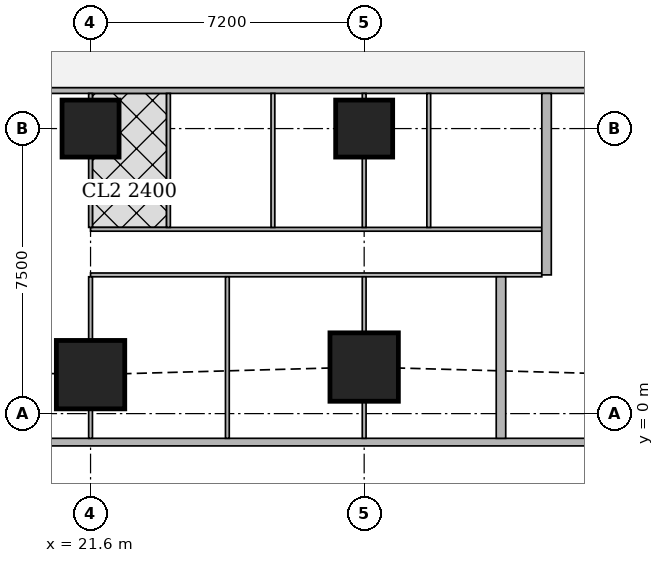
"""IFC4 building model, lengths in metres.
Left out: names, types, materials, properties, quantities, classifications, styles, units other than length and angle.
Written with IfcOpenShell. Run it as: python <this file> out.ifc"""

import sys

from ifc_helpers import new_model, si_unit, direction, frame, frame_2d, origin, origin_2d, place, context, subcontext, project, spatial, rectangle, extrude, element, fill, save


model = new_model("IFC4")
c1 = context("Model", 3, precision=1e-05, world=origin(), true_north=direction((0.0, 1.0)))
c2 = subcontext(c1, "Body", "Model", "MODEL_VIEW")
j1 = project(units=[si_unit("LENGTHUNIT", "METRE"), si_unit("PLANEANGLEUNIT", "RADIAN")], contexts=[c1])
p1 = place(None, origin())
s1 = spatial("IfcSite", under=j1, at=p1, CompositionType="ELEMENT")
p2 = place(p1, origin())
s2 = spatial("IfcBuilding", under=s1, at=p2, CompositionType="ELEMENT")
p3 = place(p2, frame((0.0, 0.0, 158.3)))
s3 = spatial("IfcBuildingStorey", under=s2, at=p3, CompositionType="ELEMENT", Elevation=158.3)
for number, where, z_axis, x_axis in (
    (1, (21.6, 1.025, 0.0), (0.0, 0.0, 1.0), (1.0, 0.0, 0.0)),
    (2, (28.8, 1.225, 0.0), (0.0, 0.0, 1.0), (1.0, 0.0, 0.0)),
):
    element("IfcColumn", number, at=place(p3, frame(where, z_axis=z_axis, x_axis=x_axis)), inside=s3, PredefinedType="COLUMN", context=c2, shape_type="SweptSolid", body=[
        extrude(rectangle(XDim=1.8, YDim=1.8, at=origin_2d()), origin(), (0.0, 0.0, 1.0), 3.75),
    ])
for number, where, z_axis, x_axis in (
    (3, (21.6, 7.5, 0.0), (0.0, 0.0, 1.0), (1.0, 0.0, 0.0)),
    (4, (28.8, 7.5, 0.0), (0.0, 0.0, 1.0), (1.0, 0.0, 0.0)),
):
    element("IfcColumn", number, at=place(p3, frame(where, z_axis=z_axis, x_axis=x_axis)), inside=s3, PredefinedType="COLUMN", context=c2, shape_type="SweptSolid", body=[
        extrude(rectangle(XDim=1.5, YDim=1.5, at=origin_2d()), origin(), (0.0, 0.0, 1.0), 3.75),
    ])
p4 = place(p3, frame((2.163, -0.75, 0.0), z_axis=(0.0, 0.0, 1.0), x_axis=(1.0, 0.0, 0.0)))
e5 = element("IfcWall", 5, at=p4, inside=s3, PredefinedType="SOLIDWALL", context=c2, shape_type="SweptSolid", body=[
    extrude(rectangle(XDim=45.628, YDim=0.2, at=frame_2d((22.814, 0.0))), origin(), (0.0, 0.0, 1.0), 3.5),
])
p5 = place(p4, frame((9.537, 0.0, 0.9)))
e6 = element("IfcOpeningElement", 6, at=p5, cuts=e5, PredefinedType="OPENING", context=c2, shape_type="SweptSolid", body=[
    extrude(rectangle(XDim=1.8, YDim=1.5, at=frame_2d((0.9, 0.75))), frame((0.0, 0.11, 0.0), z_axis=(0.0, -1.0, 0.0), x_axis=(1.0, 0.0, 0.0)), (0.0, 0.0, 1.0), 0.22),
])
p6 = place(p4, frame((13.137, 0.0, 0.9)))
e7 = element("IfcOpeningElement", 7, at=p6, cuts=e5, PredefinedType="OPENING", context=c2, shape_type="SweptSolid", body=[
    extrude(rectangle(XDim=1.8, YDim=1.5, at=frame_2d((0.9, 0.75))), frame((0.0, 0.11, 0.0), z_axis=(0.0, -1.0, 0.0), x_axis=(1.0, 0.0, 0.0)), (0.0, 0.0, 1.0), 0.22),
])
p7 = place(p4, frame((16.737, 0.0, 0.9)))
e8 = element("IfcOpeningElement", 8, at=p7, cuts=e5, PredefinedType="OPENING", context=c2, shape_type="SweptSolid", body=[
    extrude(rectangle(XDim=1.8, YDim=1.5, at=frame_2d((0.9, 0.75))), frame((0.0, 0.11, 0.0), z_axis=(0.0, -1.0, 0.0), x_axis=(1.0, 0.0, 0.0)), (0.0, 0.0, 1.0), 0.22),
])
p8 = place(p4, frame((20.337, 0.0, 0.9)))
e9 = element("IfcOpeningElement", 9, at=p8, cuts=e5, PredefinedType="OPENING", context=c2, shape_type="SweptSolid", body=[
    extrude(rectangle(XDim=1.8, YDim=1.5, at=frame_2d((0.9, 0.75))), frame((0.0, 0.11, 0.0), z_axis=(0.0, -1.0, 0.0), x_axis=(1.0, 0.0, 0.0)), (0.0, 0.0, 1.0), 0.22),
])
p9 = place(p4, frame((23.937, 0.0, 0.9)))
e10 = element("IfcOpeningElement", 10, at=p9, cuts=e5, PredefinedType="OPENING", context=c2, shape_type="SweptSolid", body=[
    extrude(rectangle(XDim=1.8, YDim=1.5, at=frame_2d((0.9, 0.75))), frame((0.0, 0.11, 0.0), z_axis=(0.0, -1.0, 0.0), x_axis=(1.0, 0.0, 0.0)), (0.0, 0.0, 1.0), 0.22),
])
p10 = place(p4, frame((27.537, 0.0, 0.9)))
e11 = element("IfcOpeningElement", 11, at=p10, cuts=e5, PredefinedType="OPENING", context=c2, shape_type="SweptSolid", body=[
    extrude(rectangle(XDim=1.8, YDim=1.5, at=frame_2d((0.9, 0.75))), frame((0.0, 0.11, 0.0), z_axis=(0.0, -1.0, 0.0), x_axis=(1.0, 0.0, 0.0)), (0.0, 0.0, 1.0), 0.22),
])
p11 = place(p4, frame((31.137, 0.0, 0.9)))
e12 = element("IfcOpeningElement", 12, at=p11, cuts=e5, PredefinedType="OPENING", context=c2, shape_type="SweptSolid", body=[
    extrude(rectangle(XDim=1.8, YDim=1.5, at=frame_2d((0.9, 0.75))), frame((0.0, 0.11, 0.0), z_axis=(0.0, -1.0, 0.0), x_axis=(1.0, 0.0, 0.0)), (0.0, 0.0, 1.0), 0.22),
])
p12 = place(p4, frame((34.737, 0.0, 0.9)))
e13 = element("IfcOpeningElement", 13, at=p12, cuts=e5, PredefinedType="OPENING", context=c2, shape_type="SweptSolid", body=[
    extrude(rectangle(XDim=1.8, YDim=1.5, at=frame_2d((0.9, 0.75))), frame((0.0, 0.11, 0.0), z_axis=(0.0, -1.0, 0.0), x_axis=(1.0, 0.0, 0.0)), (0.0, 0.0, 1.0), 0.22),
])
p13 = place(p3, frame((40.053, 8.5, 0.0), z_axis=(0.0, 0.0, 1.0), x_axis=(-1.0, 0.0, 0.0)))
e14 = element("IfcWall", 14, at=p13, inside=s3, PredefinedType="SOLIDWALL", context=c2, shape_type="SweptSolid", body=[
    extrude(rectangle(XDim=31.703, YDim=0.15, at=frame_2d((15.852, 0.0))), origin(), (0.0, 0.0, 1.0), 3.5),
])
p14 = place(p13, frame((28.103, 0.0, 0.0)))
e15 = element("IfcOpeningElement", 15, at=p14, cuts=e14, PredefinedType="OPENING", context=c2, shape_type="SweptSolid", body=[
    extrude(rectangle(XDim=1.0, YDim=2.1, at=frame_2d((0.5, 1.05))), frame((0.0, 0.085, 0.0), z_axis=(0.0, -1.0, 0.0), x_axis=(1.0, 0.0, 0.0)), (0.0, 0.0, 1.0), 0.17),
])
p15 = place(p13, frame((19.754, 0.0, 0.0)))
e16 = element("IfcOpeningElement", 16, at=p15, cuts=e14, PredefinedType="OPENING", context=c2, shape_type="SweptSolid", body=[
    extrude(rectangle(XDim=1.0, YDim=2.1, at=frame_2d((0.5, 1.05))), frame((0.0, 0.085, 0.0), z_axis=(0.0, -1.0, 0.0), x_axis=(1.0, 0.0, 0.0)), (0.0, 0.0, 1.0), 0.17),
])
p16 = place(p13, frame((5.354, 0.0, 0.0)))
e17 = element("IfcOpeningElement", 17, at=p16, cuts=e14, PredefinedType="OPENING", context=c2, shape_type="SweptSolid", body=[
    extrude(rectangle(XDim=1.0, YDim=2.1, at=frame_2d((0.5, 1.05))), frame((0.0, 0.085, 0.0), z_axis=(0.0, -1.0, 0.0), x_axis=(1.0, 0.0, 0.0)), (0.0, 0.0, 1.0), 0.17),
])
p17 = place(p3, frame((33.623, 43.022, 0.0), z_axis=(0.0, 0.0, 1.0), x_axis=(0.185596841028, -0.98262597798, 0.0)))
e18 = element("IfcWall", 18, at=p17, inside=s3, PredefinedType="SOLIDWALL", context=c2, shape_type="SweptSolid", body=[
    extrude(rectangle(XDim=41.66, YDim=0.15, at=frame_2d((20.83, 0.0))), origin(), (0.0, 0.0, 1.0), 2.5),
])
p18 = place(p17, frame((21.514, 0.0, 0.0)))
e19 = element("IfcOpeningElement", 19, at=p18, cuts=e18, PredefinedType="OPENING", context=c2, shape_type="SweptSolid", body=[
    extrude(rectangle(XDim=1.0, YDim=2.1, at=frame_2d((0.5, 1.05))), frame((0.0, 0.085, 0.0), z_axis=(0.0, -1.0, 0.0), x_axis=(1.0, 0.0, 0.0)), (0.0, 0.0, 1.0), 0.17),
])
p19 = place(p17, frame((27.062, 0.0, 0.0)))
e20 = element("IfcOpeningElement", 20, at=p19, cuts=e18, PredefinedType="OPENING", context=c2, shape_type="SweptSolid", body=[
    extrude(rectangle(XDim=1.0, YDim=2.1, at=frame_2d((0.5, 1.05))), frame((0.0, 0.085, 0.0), z_axis=(0.0, -1.0, 0.0), x_axis=(1.0, 0.0, 0.0)), (0.0, 0.0, 1.0), 0.17),
])
p20 = place(p17, frame((29.934, 0.0, 0.0)))
e21 = element("IfcOpeningElement", 21, at=p20, cuts=e18, PredefinedType="OPENING", context=c2, shape_type="SweptSolid", body=[
    extrude(rectangle(XDim=1.0, YDim=2.1, at=frame_2d((0.5, 1.05))), frame((0.0, 0.085, 0.0), z_axis=(0.0, -1.0, 0.0), x_axis=(1.0, 0.0, 0.0)), (0.0, 0.0, 1.0), 0.17),
])
p21 = place(p3, frame((33.474, 3.65, 0.0), z_axis=(0.0, 0.0, 1.0), x_axis=(-1.0, 0.0, 0.0)))
e22 = element("IfcWall", 22, at=p21, inside=s3, PredefinedType="PARTITIONING", context=c2, shape_type="SweptSolid", body=[
    extrude(rectangle(XDim=11.874, YDim=0.1, at=frame_2d((5.937, 0.0))), origin(), (0.0, 0.0, 1.0), 3.5),
])
p22 = place(p21, frame((10.774, 0.0, 0.0)))
e23 = element("IfcOpeningElement", 23, at=p22, cuts=e22, PredefinedType="OPENING", context=c2, shape_type="SweptSolid", body=[
    extrude(rectangle(XDim=0.9, YDim=2.1, at=frame_2d((0.45, 1.05))), frame((0.0, 0.06, 0.0), z_axis=(0.0, -1.0, 0.0), x_axis=(1.0, 0.0, 0.0)), (0.0, 0.0, 1.0), 0.12),
])
p23 = place(p21, frame((7.174, 0.0, 0.0)))
e24 = element("IfcOpeningElement", 24, at=p23, cuts=e22, PredefinedType="OPENING", context=c2, shape_type="SweptSolid", body=[
    extrude(rectangle(XDim=0.9, YDim=2.1, at=frame_2d((0.45, 1.05))), frame((0.0, 0.06, 0.0), z_axis=(0.0, -1.0, 0.0), x_axis=(1.0, 0.0, 0.0)), (0.0, 0.0, 1.0), 0.12),
])
p24 = place(p21, frame((3.574, 0.0, 0.0)))
e25 = element("IfcOpeningElement", 25, at=p24, cuts=e22, PredefinedType="OPENING", context=c2, shape_type="SweptSolid", body=[
    extrude(rectangle(XDim=0.9, YDim=2.1, at=frame_2d((0.45, 1.05))), frame((0.0, 0.06, 0.0), z_axis=(0.0, -1.0, 0.0), x_axis=(1.0, 0.0, 0.0)), (0.0, 0.0, 1.0), 0.12),
])
p25 = place(p3, frame((33.474, 4.85, 0.0), z_axis=(0.0, 0.0, 1.0), x_axis=(-1.0, 0.0, 0.0)))
e26 = element("IfcWall", 26, at=p25, inside=s3, PredefinedType="PARTITIONING", context=c2, shape_type="SweptSolid", body=[
    extrude(rectangle(XDim=11.874, YDim=0.1, at=frame_2d((5.937, 0.0))), origin(), (0.0, 0.0, 1.0), 3.5),
])
p26 = place(p25, frame((10.399, 0.0, 0.0)))
e27 = element("IfcOpeningElement", 27, at=p26, cuts=e26, PredefinedType="OPENING", context=c2, shape_type="SweptSolid", body=[
    extrude(rectangle(XDim=0.9, YDim=2.1, at=frame_2d((0.45, 1.05))), frame((0.0, 0.06, 0.0), z_axis=(0.0, -1.0, 0.0), x_axis=(1.0, 0.0, 0.0)), (0.0, 0.0, 1.0), 0.12),
])
p27 = place(p25, frame((5.425, 0.0, 0.0)))
e28 = element("IfcOpeningElement", 28, at=p27, cuts=e26, PredefinedType="OPENING", context=c2, shape_type="SweptSolid", body=[
    extrude(rectangle(XDim=0.9, YDim=2.1, at=frame_2d((0.45, 1.05))), frame((0.0, 0.06, 0.0), z_axis=(0.0, -1.0, 0.0), x_axis=(1.0, 0.0, 0.0)), (0.0, 0.0, 1.0), 0.12),
])
p28 = place(p25, frame((3.374, 0.0, 0.0)))
e29 = element("IfcOpeningElement", 29, at=p28, cuts=e26, PredefinedType="OPENING", context=c2, shape_type="SweptSolid", body=[
    extrude(rectangle(XDim=0.9, YDim=2.1, at=frame_2d((0.45, 1.05))), frame((0.0, 0.06, 0.0), z_axis=(0.0, -1.0, 0.0), x_axis=(1.0, 0.0, 0.0)), (0.0, 0.0, 1.0), 0.12),
])
p29 = place(p25, frame((8.0, 0.0, 0.0)))
e30 = element("IfcOpeningElement", 30, at=p29, cuts=e26, PredefinedType="OPENING", context=c2, shape_type="SweptSolid", body=[
    extrude(rectangle(XDim=0.9, YDim=2.1, at=frame_2d((0.45, 1.05))), frame((0.0, 0.06, 0.0), z_axis=(0.0, -1.0, 0.0), x_axis=(1.0, 0.0, 0.0)), (0.0, 0.0, 1.0), 0.12),
])
p30 = place(p25, frame((0.975, 0.0, 0.0)))
e31 = element("IfcOpeningElement", 31, at=p30, cuts=e26, PredefinedType="OPENING", context=c2, shape_type="SweptSolid", body=[
    extrude(rectangle(XDim=0.9, YDim=2.1, at=frame_2d((0.45, 1.05))), frame((0.0, 0.06, 0.0), z_axis=(0.0, -1.0, 0.0), x_axis=(1.0, 0.0, 0.0)), (0.0, 0.0, 1.0), 0.12),
])
p31 = place(p3, frame((21.6, -0.65, 0.0), z_axis=(0.0, 0.0, 1.0), x_axis=(0.0, 1.0, 0.0)))
e32 = element("IfcWall", 32, at=p31, inside=s3, PredefinedType="PARTITIONING", context=c2, shape_type="SweptSolid", body=[
    extrude(rectangle(XDim=0.774, YDim=0.1, at=frame_2d((0.387, 0.0))), origin(), (0.0, 0.0, 1.0), 3.5),
])
p32 = place(p3, frame((21.6, 1.926, 0.0), z_axis=(0.0, 0.0, 1.0), x_axis=(0.0, 1.0, 0.0)))
e33 = element("IfcWall", 33, at=p32, inside=s3, PredefinedType="PARTITIONING", context=c2, shape_type="SweptSolid", body=[
    extrude(rectangle(XDim=1.674, YDim=0.1, at=frame_2d((0.837, 0.0))), origin(), (0.0, 0.0, 1.0), 3.5),
])
p33 = place(p3, frame((25.2, -0.65, 0.0), z_axis=(0.0, 0.0, 1.0), x_axis=(0.0, 1.0, 0.0)))
e34 = element("IfcWall", 34, at=p33, inside=s3, PredefinedType="PARTITIONING", context=c2, shape_type="SweptSolid", body=[
    extrude(rectangle(XDim=4.25, YDim=0.1, at=frame_2d((2.125, 0.0))), origin(), (0.0, 0.0, 1.0), 2.1),
])
p34 = place(p3, frame((28.8, -0.65, 0.0), z_axis=(0.0, 0.0, 1.0), x_axis=(0.0, 1.0, 0.0)))
e35 = element("IfcWall", 35, at=p34, inside=s3, PredefinedType="PARTITIONING", context=c2, shape_type="SweptSolid", body=[
    extrude(rectangle(XDim=0.974, YDim=0.1, at=frame_2d((0.487, 0.0))), origin(), (0.0, 0.0, 1.0), 3.5),
])
p35 = place(p3, frame((28.8, 2.126, 0.0), z_axis=(0.0, 0.0, 1.0), x_axis=(0.0, 1.0, 0.0)))
e36 = element("IfcWall", 36, at=p35, inside=s3, PredefinedType="PARTITIONING", context=c2, shape_type="SweptSolid", body=[
    extrude(rectangle(XDim=1.474, YDim=0.1, at=frame_2d((0.737, 0.0))), origin(), (0.0, 0.0, 1.0), 3.5),
])
p36 = place(p3, frame((21.6, 4.9, 0.0), z_axis=(0.0, 0.0, 1.0), x_axis=(0.0, 1.0, 0.0)))
e37 = element("IfcWall", 37, at=p36, inside=s3, PredefinedType="PARTITIONING", context=c2, shape_type="SweptSolid", body=[
    extrude(rectangle(XDim=1.849, YDim=0.1, at=frame_2d((0.925, 0.0))), origin(), (0.0, 0.0, 1.0), 3.5),
])
p37 = place(p3, frame((21.6, 8.251, 0.0), z_axis=(0.0, 0.0, 1.0), x_axis=(0.0, 1.0, 0.0)))
e38 = element("IfcWall", 38, at=p37, inside=s3, PredefinedType="PARTITIONING", context=c2, shape_type="SweptSolid", body=[
    extrude(rectangle(XDim=0.174, YDim=0.1, at=frame_2d((0.087, 0.0))), origin(), (0.0, 0.0, 1.0), 3.5),
])
p38 = place(p3, frame((26.399, 4.9, 0.0), z_axis=(0.0, 0.0, 1.0), x_axis=(0.0, 1.0, 0.0)))
e39 = element("IfcWall", 39, at=p38, inside=s3, PredefinedType="PARTITIONING", context=c2, shape_type="SweptSolid", body=[
    extrude(rectangle(XDim=3.525, YDim=0.1, at=frame_2d((1.763, 0.0))), origin(), (0.0, 0.0, 1.0), 3.5),
])
p39 = place(p3, frame((28.8, 4.9, 0.0), z_axis=(0.0, 0.0, 1.0), x_axis=(0.0, 1.0, 0.0)))
e40 = element("IfcWall", 40, at=p39, inside=s3, PredefinedType="PARTITIONING", context=c2, shape_type="SweptSolid", body=[
    extrude(rectangle(XDim=1.849, YDim=0.1, at=frame_2d((0.925, 0.0))), origin(), (0.0, 0.0, 1.0), 3.5),
])
p40 = place(p3, frame((28.8, 8.251, 0.0), z_axis=(0.0, 0.0, 1.0), x_axis=(0.0, 1.0, 0.0)))
e41 = element("IfcWall", 41, at=p40, inside=s3, PredefinedType="PARTITIONING", context=c2, shape_type="SweptSolid", body=[
    extrude(rectangle(XDim=0.174, YDim=0.1, at=frame_2d((0.087, 0.0))), origin(), (0.0, 0.0, 1.0), 3.5),
])
for number, where, z_axis, x_axis in (
    (42, (23.65, 4.9, 0.0), (0.0, 0.0, 1.0), (0.0, 1.0, 0.0)),
    (43, (30.5, 4.9, 0.0), (0.0, 0.0, 1.0), (0.0, 1.0, 0.0)),
):
    element("IfcWall", number, at=place(p3, frame(where, z_axis=z_axis, x_axis=x_axis)), inside=s3, PredefinedType="PARTITIONING", context=c2, shape_type="SweptSolid", body=[
        extrude(rectangle(XDim=3.525, YDim=0.1, at=frame_2d((1.763, 0.0))), origin(), (0.0, 0.0, 1.0), 3.5),
    ])
p41 = place(p3, frame((32.4, -0.65, 0.0), z_axis=(0.0, 0.0, 1.0), x_axis=(0.0, 1.0, 0.0)))
e44 = element("IfcWall", 44, at=p41, inside=s3, PredefinedType="SOLIDWALL", context=c2, shape_type="SweptSolid", body=[
    extrude(rectangle(XDim=4.25, YDim=0.25, at=frame_2d((2.125, 0.0))), origin(), (0.0, 0.0, 1.0), 2.1),
])
p42 = place(p3, frame((33.599, 3.65, 0.0), z_axis=(0.0, 0.0, 1.0), x_axis=(0.0, 1.0, 0.0)))
e45 = element("IfcWall", 45, at=p42, inside=s3, PredefinedType="SOLIDWALL", context=c2, shape_type="SweptSolid", body=[
    extrude(rectangle(XDim=4.775, YDim=0.25, at=frame_2d((2.388, 0.0))), origin(), (0.0, 0.0, 1.0), 3.5),
])
p43 = place(p7, origin())
e46 = element("IfcWindow", 46, at=p43, inside=s3, PartitioningType="SINGLE_PANEL", PredefinedType="WINDOW", context=c2, shape_type="SweptSolid", body=[
    extrude(rectangle(XDim=1.8, YDim=1.5, at=frame_2d((0.9, 0.75))), frame((0.0, 0.03, 0.0), z_axis=(0.0, -1.0, 0.0), x_axis=(1.0, 0.0, 0.0)), (0.0, 0.0, 1.0), 0.06),
])
fill(e8, e46)
p44 = place(p8, origin())
e47 = element("IfcWindow", 47, at=p44, inside=s3, PartitioningType="SINGLE_PANEL", PredefinedType="WINDOW", context=c2, shape_type="SweptSolid", body=[
    extrude(rectangle(XDim=1.8, YDim=1.5, at=frame_2d((0.9, 0.75))), frame((0.0, 0.03, 0.0), z_axis=(0.0, -1.0, 0.0), x_axis=(1.0, 0.0, 0.0)), (0.0, 0.0, 1.0), 0.06),
])
fill(e9, e47)
p45 = place(p9, origin())
e48 = element("IfcWindow", 48, at=p45, inside=s3, PartitioningType="SINGLE_PANEL", PredefinedType="WINDOW", context=c2, shape_type="SweptSolid", body=[
    extrude(rectangle(XDim=1.8, YDim=1.5, at=frame_2d((0.9, 0.75))), frame((0.0, 0.03, 0.0), z_axis=(0.0, -1.0, 0.0), x_axis=(1.0, 0.0, 0.0)), (0.0, 0.0, 1.0), 0.06),
])
fill(e10, e48)
p46 = place(p10, origin())
e49 = element("IfcWindow", 49, at=p46, inside=s3, PartitioningType="SINGLE_PANEL", PredefinedType="WINDOW", context=c2, shape_type="SweptSolid", body=[
    extrude(rectangle(XDim=1.8, YDim=1.5, at=frame_2d((0.9, 0.75))), frame((0.0, 0.03, 0.0), z_axis=(0.0, -1.0, 0.0), x_axis=(1.0, 0.0, 0.0)), (0.0, 0.0, 1.0), 0.06),
])
fill(e11, e49)
p47 = place(p11, origin())
e50 = element("IfcWindow", 50, at=p47, inside=s3, PartitioningType="SINGLE_PANEL", PredefinedType="WINDOW", context=c2, shape_type="SweptSolid", body=[
    extrude(rectangle(XDim=1.8, YDim=1.5, at=frame_2d((0.9, 0.75))), frame((0.0, 0.03, 0.0), z_axis=(0.0, -1.0, 0.0), x_axis=(1.0, 0.0, 0.0)), (0.0, 0.0, 1.0), 0.06),
])
fill(e12, e50)
p48 = place(p22, origin())
e51 = element("IfcDoor", 51, at=p48, inside=s3, OperationType="SINGLE_SWING_RIGHT", PredefinedType="DOOR", context=c2, shape_type="SweptSolid", body=[
    extrude(rectangle(XDim=0.9, YDim=2.1, at=frame_2d((0.45, 1.05))), frame((0.0, 0.025, 0.0), z_axis=(0.0, -1.0, 0.0), x_axis=(1.0, 0.0, 0.0)), (0.0, 0.0, 1.0), 0.05),
])
fill(e23, e51)
p49 = place(p23, origin())
e52 = element("IfcDoor", 52, at=p49, inside=s3, OperationType="SINGLE_SWING_RIGHT", PredefinedType="DOOR", context=c2, shape_type="SweptSolid", body=[
    extrude(rectangle(XDim=0.9, YDim=2.1, at=frame_2d((0.45, 1.05))), frame((0.0, 0.025, 0.0), z_axis=(0.0, -1.0, 0.0), x_axis=(1.0, 0.0, 0.0)), (0.0, 0.0, 1.0), 0.05),
])
fill(e24, e52)
p50 = place(p24, origin())
e53 = element("IfcDoor", 53, at=p50, inside=s3, OperationType="SINGLE_SWING_RIGHT", PredefinedType="DOOR", context=c2, shape_type="SweptSolid", body=[
    extrude(rectangle(XDim=0.9, YDim=2.1, at=frame_2d((0.45, 1.05))), frame((0.0, 0.025, 0.0), z_axis=(0.0, -1.0, 0.0), x_axis=(1.0, 0.0, 0.0)), (0.0, 0.0, 1.0), 0.05),
])
fill(e25, e53)
p51 = place(p26, origin())
e54 = element("IfcDoor", 54, at=p51, inside=s3, OperationType="SINGLE_SWING_LEFT", PredefinedType="DOOR", context=c2, shape_type="SweptSolid", body=[
    extrude(rectangle(XDim=0.9, YDim=2.1, at=frame_2d((0.45, 1.05))), frame((0.0, 0.025, 0.0), z_axis=(0.0, -1.0, 0.0), x_axis=(1.0, 0.0, 0.0)), (0.0, 0.0, 1.0), 0.05),
])
fill(e27, e54)
p52 = place(p27, origin())
e55 = element("IfcDoor", 55, at=p52, inside=s3, OperationType="SINGLE_SWING_RIGHT", PredefinedType="DOOR", context=c2, shape_type="SweptSolid", body=[
    extrude(rectangle(XDim=0.9, YDim=2.1, at=frame_2d((0.45, 1.05))), frame((0.0, 0.025, 0.0), z_axis=(0.0, -1.0, 0.0), x_axis=(1.0, 0.0, 0.0)), (0.0, 0.0, 1.0), 0.05),
])
fill(e28, e55)
p53 = place(p28, origin())
e56 = element("IfcDoor", 56, at=p53, inside=s3, OperationType="SINGLE_SWING_RIGHT", PredefinedType="DOOR", context=c2, shape_type="SweptSolid", body=[
    extrude(rectangle(XDim=0.9, YDim=2.1, at=frame_2d((0.45, 1.05))), frame((0.0, 0.025, 0.0), z_axis=(0.0, -1.0, 0.0), x_axis=(1.0, 0.0, 0.0)), (0.0, 0.0, 1.0), 0.05),
])
fill(e29, e56)
p54 = place(p29, origin())
e57 = element("IfcDoor", 57, at=p54, inside=s3, OperationType="SINGLE_SWING_LEFT", PredefinedType="DOOR", context=c2, shape_type="SweptSolid", body=[
    extrude(rectangle(XDim=0.9, YDim=2.1, at=frame_2d((0.45, 1.05))), frame((0.0, 0.025, 0.0), z_axis=(0.0, -1.0, 0.0), x_axis=(1.0, 0.0, 0.0)), (0.0, 0.0, 1.0), 0.05),
])
fill(e30, e57)
p55 = place(p30, origin())
e58 = element("IfcDoor", 58, at=p55, inside=s3, OperationType="SINGLE_SWING_RIGHT", PredefinedType="DOOR", context=c2, shape_type="SweptSolid", body=[
    extrude(rectangle(XDim=0.9, YDim=2.1, at=frame_2d((0.45, 1.05))), frame((0.0, 0.025, 0.0), z_axis=(0.0, -1.0, 0.0), x_axis=(1.0, 0.0, 0.0)), (0.0, 0.0, 1.0), 0.05),
])
fill(e31, e58)
p56 = place(p16, origin())
e59 = element("IfcDoor", 59, at=p56, inside=s3, OperationType="SINGLE_SWING_RIGHT", PredefinedType="DOOR", context=c2, shape_type="SweptSolid", body=[
    extrude(rectangle(XDim=1.0, YDim=2.1, at=frame_2d((0.5, 1.05))), frame((0.0, 0.025, 0.0), z_axis=(0.0, -1.0, 0.0), x_axis=(1.0, 0.0, 0.0)), (0.0, 0.0, 1.0), 0.05),
])
fill(e17, e59)
save(model, sys.argv[1])
